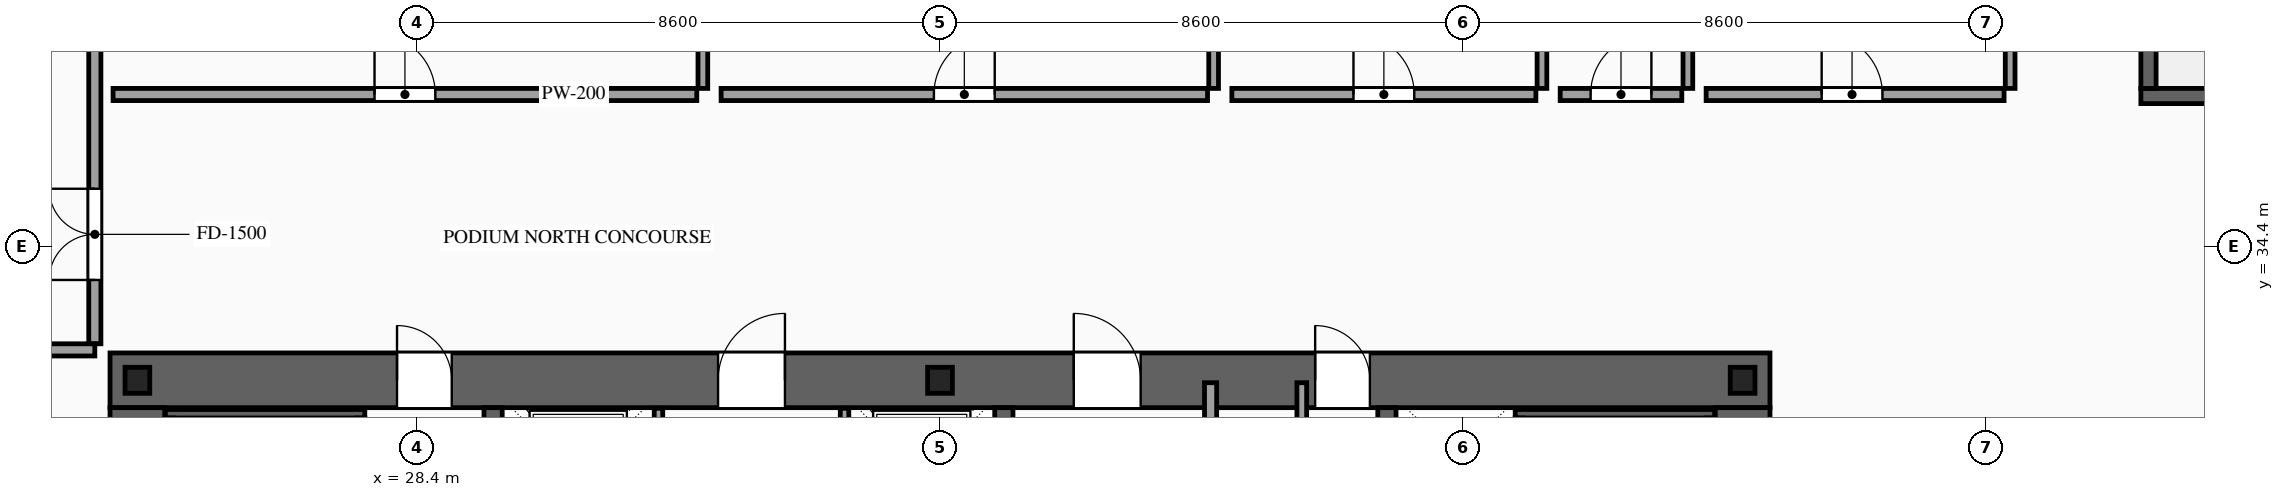
"""IFC4 building model, lengths in metres.
Left out: names, types, materials, properties, quantities, classifications, styles, units other than length and angle.
Written with IfcOpenShell. Run it as: python <this file> out.ifc"""

import sys

from ifc_helpers import new_model, si_unit, direction, frame, frame_2d, origin, origin_2d, place, context, subcontext, project, spatial, rectangle, i_section, extrude, source, transform, mapped, element, fill, save


model = new_model("IFC4")
c1 = context("Model", 3, precision=1e-05, world=origin(), true_north=direction((0.0, 1.0)))
c2 = subcontext(c1, "Body", "Model", "MODEL_VIEW")
j1 = project(units=[si_unit("LENGTHUNIT", "METRE"), si_unit("PLANEANGLEUNIT", "RADIAN")], contexts=[c1])
p1 = place(None, origin())
s1 = spatial("IfcSite", under=j1, at=p1, CompositionType="ELEMENT")
p2 = place(p1, origin())
s2 = spatial("IfcBuilding", under=s1, at=p2, CompositionType="ELEMENT")
p3 = place(p2, frame((0.0, 0.0, 19.8)))
s3 = spatial("IfcBuildingStorey", under=s2, at=p3, CompositionType="ELEMENT", Elevation=19.8)
p4 = place(p3, frame((23.35, 32.2, 0.0), z_axis=(0.0, 0.0, 1.0), x_axis=(1.0, 0.0, 0.0)))
e1 = element("IfcWall", 1, at=p4, inside=s3, PredefinedType="SHEAR", context=c2, shape_type="SweptSolid", body=[
    extrude(rectangle(XDim=27.3, YDim=0.9, at=frame_2d((13.65, 0.0))), origin(), (0.0, 0.0, 1.0), 6.0),
])
p5 = place(p4, frame((4.72, 0.0, 0.0)))
e2 = element("IfcOpeningElement", 2, at=p5, cuts=e1, PredefinedType="OPENING", context=c2, shape_type="SweptSolid", body=[
    extrude(rectangle(XDim=0.9, YDim=2.15, at=frame_2d((0.45, 1.075))), frame((0.0, 0.465, 0.0), z_axis=(0.0, -1.0, 0.0), x_axis=(1.0, 0.0, 0.0)), (0.0, 0.0, 1.0), 0.93),
])
p6 = place(p4, frame((10.0, 0.0, 0.0)))
e3 = element("IfcOpeningElement", 3, at=p6, cuts=e1, PredefinedType="OPENING", context=c2, shape_type="SweptSolid", body=[
    extrude(rectangle(XDim=1.1, YDim=2.2, at=frame_2d((0.55, 1.1))), frame((0.0, 0.465, 0.0), z_axis=(0.0, -1.0, 0.0), x_axis=(1.0, 0.0, 0.0)), (0.0, 0.0, 1.0), 0.93),
])
p7 = place(p4, frame((15.85, 0.0, 0.0)))
e4 = element("IfcOpeningElement", 4, at=p7, cuts=e1, PredefinedType="OPENING", context=c2, shape_type="SweptSolid", body=[
    extrude(rectangle(XDim=1.1, YDim=2.2, at=frame_2d((0.55, 1.1))), frame((0.0, 0.465, 0.0), z_axis=(0.0, -1.0, 0.0), x_axis=(1.0, 0.0, 0.0)), (0.0, 0.0, 1.0), 0.93),
])
p8 = place(p4, frame((19.82, 0.0, 0.0)))
e5 = element("IfcOpeningElement", 5, at=p8, cuts=e1, PredefinedType="OPENING", context=c2, shape_type="SweptSolid", body=[
    extrude(rectangle(XDim=0.9, YDim=2.15, at=frame_2d((0.45, 1.075))), frame((0.0, 0.465, 0.0), z_axis=(0.0, -1.0, 0.0), x_axis=(1.0, 0.0, 0.0)), (0.0, 0.0, 1.0), 0.93),
])
m1 = source(origin(), c2, "Body", "SweptSolid", [
    extrude(rectangle(XDim=11.9, YDim=0.9, at=frame_2d((5.95, 0.0))), origin(), (0.0, 0.0, 1.0), 6.0),
])
for number, where, z_axis, x_axis in (
    (6, (23.8, 19.85, 0.0), (0.0, 0.0, 1.0), (0.0, 1.0, 0.0)),
    (7, (50.2, 19.85, 0.0), (0.0, 0.0, 1.0), (0.0, 1.0, 0.0)),
):
    element("IfcWall", number, at=place(p3, frame(where, z_axis=z_axis, x_axis=x_axis)), inside=s3, PredefinedType="SHEAR", context=c2, shape_type="MappedRepresentation", body=[
        mapped(m1, transform((0.0, 0.0, 0.0), scale=1.0)),
    ])
m2 = source(origin(), c2, "Body", "SweptSolid", [
    extrude(rectangle(XDim=11.9, YDim=0.3, at=frame_2d((5.95, 0.0))), origin(), (0.0, 0.0, 1.0), 6.0),
])
for number, where, z_axis, x_axis in (
    (8, (29.65, 19.85, 0.0), (0.0, 0.0, 1.0), (0.0, 1.0, 0.0)),
    (9, (38.05, 19.85, 0.0), (0.0, 0.0, 1.0), (0.0, 1.0, 0.0)),
    (10, (44.35, 19.85, 0.0), (0.0, 0.0, 1.0), (0.0, 1.0, 0.0)),
):
    element("IfcWall", number, at=place(p3, frame(where, z_axis=z_axis, x_axis=x_axis)), inside=s3, PredefinedType="SOLIDWALL", context=c2, shape_type="MappedRepresentation", body=[
        mapped(m2, transform((0.0, 0.0, 0.0), scale=1.0)),
    ])
m3 = source(origin(), c2, "Body", "SweptSolid", [
    extrude(i_section(OverallWidth=0.407, OverallDepth=0.428, WebThickness=0.02, FlangeThickness=0.035, at=origin_2d()), origin(), (0.0, 0.0, 1.0), 6.0),
])
for number, where, z_axis, x_axis in (
    (11, (23.8, 32.2, 0.0), (0.0, 0.0, 1.0), (1.0, 0.0, 0.0)),
    (12, (37.0, 32.2, 0.0), (0.0, 0.0, 1.0), (1.0, 0.0, 0.0)),
    (13, (50.2, 32.2, 0.0), (0.0, 0.0, 1.0), (1.0, 0.0, 0.0)),
):
    element("IfcColumn", number, at=place(p3, frame(where, z_axis=z_axis, x_axis=x_axis)), inside=s3, PredefinedType="COLUMN", context=c2, shape_type="MappedRepresentation", body=[
        mapped(m3, transform((0.0, 0.0, 0.0), scale=1.0)),
    ])
p9 = place(p3, frame((32.37, 29.4, 0.0), z_axis=(0.0, 0.0, 1.0), x_axis=(0.0, 1.0, 0.0)))
e14 = element("IfcWall", 14, at=p9, inside=s3, PredefinedType="SOLIDWALL", context=c2, shape_type="SweptSolid", body=[
    extrude(rectangle(XDim=2.34, YDim=0.14, at=frame_2d((1.17, 0.0))), origin(), (0.0, 0.0, 1.0), 5.68),
])
p10 = place(p9, frame((0.62, 0.0, 0.0)))
e15 = element("IfcOpeningElement", 15, at=p10, cuts=e14, PredefinedType="OPENING", context=c2, shape_type="SweptSolid", body=[
    extrude(rectangle(XDim=1.1, YDim=2.2, at=frame_2d((0.55, 1.1))), frame((0.0, 0.085, 0.0), z_axis=(0.0, -1.0, 0.0), x_axis=(1.0, 0.0, 0.0)), (0.0, 0.0, 1.0), 0.17),
])
p11 = place(p3, frame((35.43, 29.4, 0.0), z_axis=(0.0, 0.0, 1.0), x_axis=(0.0, 1.0, 0.0)))
e16 = element("IfcWall", 16, at=p11, inside=s3, PredefinedType="SOLIDWALL", context=c2, shape_type="SweptSolid", body=[
    extrude(rectangle(XDim=2.34, YDim=0.14, at=frame_2d((1.17, 0.0))), origin(), (0.0, 0.0, 1.0), 5.68),
])
p12 = place(p11, frame((0.62, 0.0, 0.0)))
e17 = element("IfcOpeningElement", 17, at=p12, cuts=e16, PredefinedType="OPENING", context=c2, shape_type="SweptSolid", body=[
    extrude(rectangle(XDim=1.1, YDim=2.2, at=frame_2d((0.55, 1.1))), frame((0.0, 0.085, 0.0), z_axis=(0.0, -1.0, 0.0), x_axis=(1.0, 0.0, 0.0)), (0.0, 0.0, 1.0), 0.17),
])
m4 = source(origin(), c2, "Body", "SweptSolid", [
    extrude(rectangle(XDim=3.28, YDim=0.14, at=frame_2d((1.64, 0.0))), origin(), (0.0, 0.0, 1.0), 5.68),
])
for number, where, z_axis, x_axis in (
    (18, (24.26, 31.65, 0.0), (0.0, 0.0, 1.0), (1.0, 0.0, 0.0)),
    (19, (46.46, 31.65, 0.0), (0.0, 0.0, 1.0), (1.0, 0.0, 0.0)),
):
    element("IfcWall", number, at=place(p3, frame(where, z_axis=z_axis, x_axis=x_axis)), inside=s3, PredefinedType="SOLIDWALL", context=c2, shape_type="MappedRepresentation", body=[
        mapped(m4, transform((0.0, 0.0, 0.0), scale=1.0)),
    ])
m5 = source(origin(), c2, "Body", "SweptSolid", [
    extrude(rectangle(XDim=4.3, YDim=0.25, at=frame_2d((2.15, 0.0))), origin(), (0.0, 0.0, 1.0), 5.68),
])
p13 = place(p3, frame((56.75, 36.875, 0.0), z_axis=(0.0, 0.0, 1.0), x_axis=(1.0, 0.0, 0.0)))
e20 = element("IfcWall", 20, at=p13, inside=s3, PredefinedType="SOLIDWALL", context=c2, shape_type="MappedRepresentation", body=[
    mapped(m5, transform((0.0, 0.0, 0.0), scale=1.0)),
])
p14 = place(p3, frame((56.875, 37.0, 0.0), z_axis=(0.0, 0.0, 1.0), x_axis=(0.0, 1.0, 0.0)))
e21 = element("IfcWall", 21, at=p14, inside=s3, PredefinedType="SOLIDWALL", context=c2, shape_type="SweptSolid", body=[
    extrude(rectangle(XDim=9.6, YDim=0.25, at=frame_2d((4.8, 0.0))), origin(), (0.0, 0.0, 1.0), 5.68),
])
p15 = place(p14, frame((8.15, 0.0, 0.0)))
e22 = element("IfcOpeningElement", 22, at=p15, cuts=e21, PredefinedType="OPENING", context=c2, shape_type="SweptSolid", body=[
    extrude(rectangle(XDim=1.1, YDim=2.2, at=frame_2d((0.55, 1.1))), frame((0.0, 0.14, 0.0), z_axis=(0.0, -1.0, 0.0), x_axis=(1.0, 0.0, 0.0)), (0.0, 0.0, 1.0), 0.28),
])
m6 = source(origin(), c2, "Body", "SweptSolid", [
    extrude(rectangle(XDim=12.72, YDim=0.2, at=frame_2d((6.36, 0.0))), origin(), (0.0, 0.0, 1.0), 5.68),
])
p16 = place(p3, frame((41.45, 19.44, 0.0), z_axis=(0.0, 0.0, 1.0), x_axis=(0.0, 1.0, 0.0)))
e23 = element("IfcWall", 23, at=p16, inside=s3, PredefinedType="PARTITIONING", context=c2, shape_type="MappedRepresentation", body=[
    mapped(m6, transform((0.0, 0.0, 0.0), scale=1.0)),
])
m7 = source(origin(), c2, "Body", "SweptSolid", [
    extrude(rectangle(XDim=10.72, YDim=0.16, at=frame_2d((5.36, 0.0))), origin(), (0.0, 0.0, 1.0), 5.68),
])
p17 = place(p3, frame((42.95, 21.44, 0.0), z_axis=(0.0, 0.0, 1.0), x_axis=(0.0, 1.0, 0.0)))
e24 = element("IfcWall", 24, at=p17, inside=s3, PredefinedType="PARTITIONING", context=c2, shape_type="MappedRepresentation", body=[
    mapped(m7, transform((0.0, 0.0, 0.0), scale=1.0)),
])
p18 = place(p3, frame((23.1, 32.8, 0.0), z_axis=(0.0, 0.0, 1.0), x_axis=(0.0, 1.0, 0.0)))
e25 = element("IfcWall", 25, at=p18, inside=s3, PredefinedType="PARTITIONING", context=c2, shape_type="SweptSolid", body=[
    extrude(rectangle(XDim=16.82, YDim=0.2, at=frame_2d((8.41, 0.0))), origin(), (0.0, 0.0, 1.0), 5.68),
])
p19 = place(p18, frame((1.05, 0.0, 0.0)))
e26 = element("IfcOpeningElement", 26, at=p19, cuts=e25, PredefinedType="OPENING", context=c2, shape_type="SweptSolid", body=[
    extrude(rectangle(XDim=1.5, YDim=2.3, at=frame_2d((0.75, 1.15))), frame((0.0, 0.115, 0.0), z_axis=(0.0, -1.0, 0.0), x_axis=(1.0, 0.0, 0.0)), (0.0, 0.0, 1.0), 0.23),
])
m8 = source(origin(), c2, "Body", "SweptSolid", [
    extrude(rectangle(XDim=10.7, YDim=0.2, at=frame_2d((5.35, 0.0))), origin(), (0.0, 0.0, 1.0), 5.68),
])
p20 = place(p3, frame((12.4, 32.7, 0.0), z_axis=(0.0, 0.0, 1.0), x_axis=(1.0, 0.0, 0.0)))
e27 = element("IfcWall", 27, at=p20, inside=s3, PredefinedType="PARTITIONING", context=c2, shape_type="MappedRepresentation", body=[
    mapped(m8, transform((0.0, 0.0, 0.0), scale=1.0)),
])
p21 = place(p3, frame((23.4, 36.9, 0.0), z_axis=(0.0, 0.0, 1.0), x_axis=(1.0, 0.0, 0.0)))
e28 = element("IfcWall", 28, at=p21, inside=s3, PredefinedType="PARTITIONING", context=c2, shape_type="SweptSolid", body=[
    extrude(rectangle(XDim=9.6, YDim=0.2, at=frame_2d((4.8, 0.0))), origin(), (0.0, 0.0, 1.0), 5.68),
])
p22 = place(p21, frame((4.3, 0.0, 0.0)))
e29 = element("IfcOpeningElement", 29, at=p22, cuts=e28, PredefinedType="OPENING", context=c2, shape_type="SweptSolid", body=[
    extrude(rectangle(XDim=1.0, YDim=2.2, at=frame_2d((0.5, 1.1))), frame((0.0, 0.115, 0.0), z_axis=(0.0, -1.0, 0.0), x_axis=(1.0, 0.0, 0.0)), (0.0, 0.0, 1.0), 0.23),
])
m9 = source(origin(), c2, "Body", "SweptSolid", [
    extrude(rectangle(XDim=12.62, YDim=0.16, at=frame_2d((6.31, 0.0))), origin(), (0.0, 0.0, 1.0), 5.68),
])
p23 = place(p3, frame((33.1, 37.0, 0.0), z_axis=(0.0, 0.0, 1.0), x_axis=(0.0, 1.0, 0.0)))
e30 = element("IfcWall", 30, at=p23, inside=s3, PredefinedType="PARTITIONING", context=c2, shape_type="MappedRepresentation", body=[
    mapped(m9, transform((0.0, 0.0, 0.0), scale=1.0)),
])
p24 = place(p3, frame((33.4, 36.9, 0.0), z_axis=(0.0, 0.0, 1.0), x_axis=(1.0, 0.0, 0.0)))
e31 = element("IfcWall", 31, at=p24, inside=s3, PredefinedType="PARTITIONING", context=c2, shape_type="SweptSolid", body=[
    extrude(rectangle(XDim=8.0, YDim=0.2, at=frame_2d((4.0, 0.0))), origin(), (0.0, 0.0, 1.0), 5.68),
])
p25 = place(p24, frame((3.5, 0.0, 0.0)))
e32 = element("IfcOpeningElement", 32, at=p25, cuts=e31, PredefinedType="OPENING", context=c2, shape_type="SweptSolid", body=[
    extrude(rectangle(XDim=1.0, YDim=2.2, at=frame_2d((0.5, 1.1))), frame((0.0, 0.115, 0.0), z_axis=(0.0, -1.0, 0.0), x_axis=(1.0, 0.0, 0.0)), (0.0, 0.0, 1.0), 0.23),
])
p26 = place(p3, frame((41.5, 37.0, 0.0), z_axis=(0.0, 0.0, 1.0), x_axis=(0.0, 1.0, 0.0)))
e33 = element("IfcWall", 33, at=p26, inside=s3, PredefinedType="PARTITIONING", context=c2, shape_type="MappedRepresentation", body=[
    mapped(m9, transform((0.0, 0.0, 0.0), scale=1.0)),
])
p27 = place(p3, frame((41.8, 36.9, 0.0), z_axis=(0.0, 0.0, 1.0), x_axis=(1.0, 0.0, 0.0)))
e34 = element("IfcWall", 34, at=p27, inside=s3, PredefinedType="PARTITIONING", context=c2, shape_type="SweptSolid", body=[
    extrude(rectangle(XDim=5.0, YDim=0.2, at=frame_2d((2.5, 0.0))), origin(), (0.0, 0.0, 1.0), 5.68),
])
p28 = place(p27, frame((2.0, 0.0, 0.0)))
e35 = element("IfcOpeningElement", 35, at=p28, cuts=e34, PredefinedType="OPENING", context=c2, shape_type="SweptSolid", body=[
    extrude(rectangle(XDim=1.0, YDim=2.2, at=frame_2d((0.5, 1.1))), frame((0.0, 0.115, 0.0), z_axis=(0.0, -1.0, 0.0), x_axis=(1.0, 0.0, 0.0)), (0.0, 0.0, 1.0), 0.23),
])
p29 = place(p3, frame((46.9, 37.0, 0.0), z_axis=(0.0, 0.0, 1.0), x_axis=(0.0, 1.0, 0.0)))
e36 = element("IfcWall", 36, at=p29, inside=s3, PredefinedType="PARTITIONING", context=c2, shape_type="MappedRepresentation", body=[
    mapped(m9, transform((0.0, 0.0, 0.0), scale=1.0)),
])
p30 = place(p3, frame((47.2, 36.9, 0.0), z_axis=(0.0, 0.0, 1.0), x_axis=(1.0, 0.0, 0.0)))
e37 = element("IfcWall", 37, at=p30, inside=s3, PredefinedType="PARTITIONING", context=c2, shape_type="SweptSolid", body=[
    extrude(rectangle(XDim=2.0, YDim=0.2, at=frame_2d((1.0, 0.0))), origin(), (0.0, 0.0, 1.0), 5.68),
])
p31 = place(p30, frame((0.5, 0.0, 0.0)))
e38 = element("IfcOpeningElement", 38, at=p31, cuts=e37, PredefinedType="OPENING", context=c2, shape_type="SweptSolid", body=[
    extrude(rectangle(XDim=1.0, YDim=2.2, at=frame_2d((0.5, 1.1))), frame((0.0, 0.115, 0.0), z_axis=(0.0, -1.0, 0.0), x_axis=(1.0, 0.0, 0.0)), (0.0, 0.0, 1.0), 0.23),
])
p32 = place(p3, frame((49.3, 37.0, 0.0), z_axis=(0.0, 0.0, 1.0), x_axis=(0.0, 1.0, 0.0)))
e39 = element("IfcWall", 39, at=p32, inside=s3, PredefinedType="PARTITIONING", context=c2, shape_type="MappedRepresentation", body=[
    mapped(m9, transform((0.0, 0.0, 0.0), scale=1.0)),
])
p33 = place(p3, frame((49.6, 36.9, 0.0), z_axis=(0.0, 0.0, 1.0), x_axis=(1.0, 0.0, 0.0)))
e40 = element("IfcWall", 40, at=p33, inside=s3, PredefinedType="PARTITIONING", context=c2, shape_type="SweptSolid", body=[
    extrude(rectangle(XDim=4.9, YDim=0.2, at=frame_2d((2.45, 0.0))), origin(), (0.0, 0.0, 1.0), 5.68),
])
p34 = place(p33, frame((1.9, 0.0, 0.0)))
e41 = element("IfcOpeningElement", 41, at=p34, cuts=e40, PredefinedType="OPENING", context=c2, shape_type="SweptSolid", body=[
    extrude(rectangle(XDim=1.0, YDim=2.2, at=frame_2d((0.5, 1.1))), frame((0.0, 0.115, 0.0), z_axis=(0.0, -1.0, 0.0), x_axis=(1.0, 0.0, 0.0)), (0.0, 0.0, 1.0), 0.23),
])
p35 = place(p3, frame((54.6, 37.0, 0.0), z_axis=(0.0, 0.0, 1.0), x_axis=(0.0, 1.0, 0.0)))
e42 = element("IfcWall", 42, at=p35, inside=s3, PredefinedType="PARTITIONING", context=c2, shape_type="MappedRepresentation", body=[
    mapped(m9, transform((0.0, 0.0, 0.0), scale=1.0)),
])
m10 = source(origin(), c2, "Body", "SweptSolid", [
    extrude(rectangle(XDim=0.9, YDim=2.15, at=frame_2d((0.45, 1.075))), frame((0.0, 0.025, 0.0), z_axis=(0.0, -1.0, 0.0), x_axis=(1.0, 0.0, 0.0)), (0.0, 0.0, 1.0), 0.05),
])
p36 = place(p5, origin())
e43 = element("IfcDoor", 43, at=p36, inside=s3, OperationType="SINGLE_SWING_LEFT", PredefinedType="DOOR", context=c2, shape_type="MappedRepresentation", body=[
    mapped(m10, transform((0.0, 0.0, 0.0), scale=1.0)),
])
fill(e2, e43)
m11 = source(origin(), c2, "Body", "SweptSolid", [
    extrude(rectangle(XDim=1.1, YDim=2.2, at=frame_2d((0.55, 1.1))), frame((0.0, 0.025, 0.0), z_axis=(0.0, -1.0, 0.0), x_axis=(1.0, 0.0, 0.0)), (0.0, 0.0, 1.0), 0.05),
])
p37 = place(p6, origin())
e44 = element("IfcDoor", 44, at=p37, inside=s3, OperationType="SINGLE_SWING_RIGHT", PredefinedType="DOOR", context=c2, shape_type="MappedRepresentation", body=[
    mapped(m11, transform((0.0, 0.0, 0.0), scale=1.0)),
])
fill(e3, e44)
p38 = place(p7, origin())
e45 = element("IfcDoor", 45, at=p38, inside=s3, OperationType="SINGLE_SWING_LEFT", PredefinedType="DOOR", context=c2, shape_type="MappedRepresentation", body=[
    mapped(m11, transform((0.0, 0.0, 0.0), scale=1.0)),
])
fill(e4, e45)
p39 = place(p8, origin())
e46 = element("IfcDoor", 46, at=p39, inside=s3, OperationType="SINGLE_SWING_LEFT", PredefinedType="DOOR", context=c2, shape_type="MappedRepresentation", body=[
    mapped(m10, transform((0.0, 0.0, 0.0), scale=1.0)),
])
fill(e5, e46)
m12 = source(origin(), c2, "Body", "SweptSolid", [
    extrude(rectangle(XDim=1.5, YDim=2.3, at=frame_2d((0.75, 1.15))), frame((0.0, 0.025, 0.0), z_axis=(0.0, -1.0, 0.0), x_axis=(1.0, 0.0, 0.0)), (0.0, 0.0, 1.0), 0.05),
])
p40 = place(p19, origin())
e47 = element("IfcDoor", 47, at=p40, inside=s3, OperationType="DOUBLE_DOOR_SINGLE_SWING", PredefinedType="DOOR", context=c2, shape_type="MappedRepresentation", body=[
    mapped(m12, transform((0.0, 0.0, 0.0), scale=1.0)),
])
fill(e26, e47)
m13 = source(origin(), c2, "Body", "SweptSolid", [
    extrude(rectangle(XDim=1.0, YDim=2.2, at=frame_2d((0.5, 1.1))), frame((0.0, 0.025, 0.0), z_axis=(0.0, -1.0, 0.0), x_axis=(1.0, 0.0, 0.0)), (0.0, 0.0, 1.0), 0.05),
])
p41 = place(p22, origin())
e48 = element("IfcDoor", 48, at=p41, inside=s3, OperationType="SINGLE_SWING_LEFT", PredefinedType="DOOR", context=c2, shape_type="MappedRepresentation", body=[
    mapped(m13, transform((0.0, 0.0, 0.0), scale=1.0)),
])
fill(e29, e48)
p42 = place(p25, origin())
e49 = element("IfcDoor", 49, at=p42, inside=s3, OperationType="SINGLE_SWING_RIGHT", PredefinedType="DOOR", context=c2, shape_type="MappedRepresentation", body=[
    mapped(m13, transform((0.0, 0.0, 0.0), scale=1.0)),
])
fill(e32, e49)
p43 = place(p28, origin())
e50 = element("IfcDoor", 50, at=p43, inside=s3, OperationType="SINGLE_SWING_LEFT", PredefinedType="DOOR", context=c2, shape_type="MappedRepresentation", body=[
    mapped(m13, transform((0.0, 0.0, 0.0), scale=1.0)),
])
fill(e35, e50)
p44 = place(p31, origin())
e51 = element("IfcDoor", 51, at=p44, inside=s3, OperationType="SINGLE_SWING_RIGHT", PredefinedType="DOOR", context=c2, shape_type="MappedRepresentation", body=[
    mapped(m13, transform((0.0, 0.0, 0.0), scale=1.0)),
])
fill(e38, e51)
p45 = place(p34, origin())
e52 = element("IfcDoor", 52, at=p45, inside=s3, OperationType="SINGLE_SWING_LEFT", PredefinedType="DOOR", context=c2, shape_type="MappedRepresentation", body=[
    mapped(m13, transform((0.0, 0.0, 0.0), scale=1.0)),
])
fill(e41, e52)
save(model, sys.argv[1])
